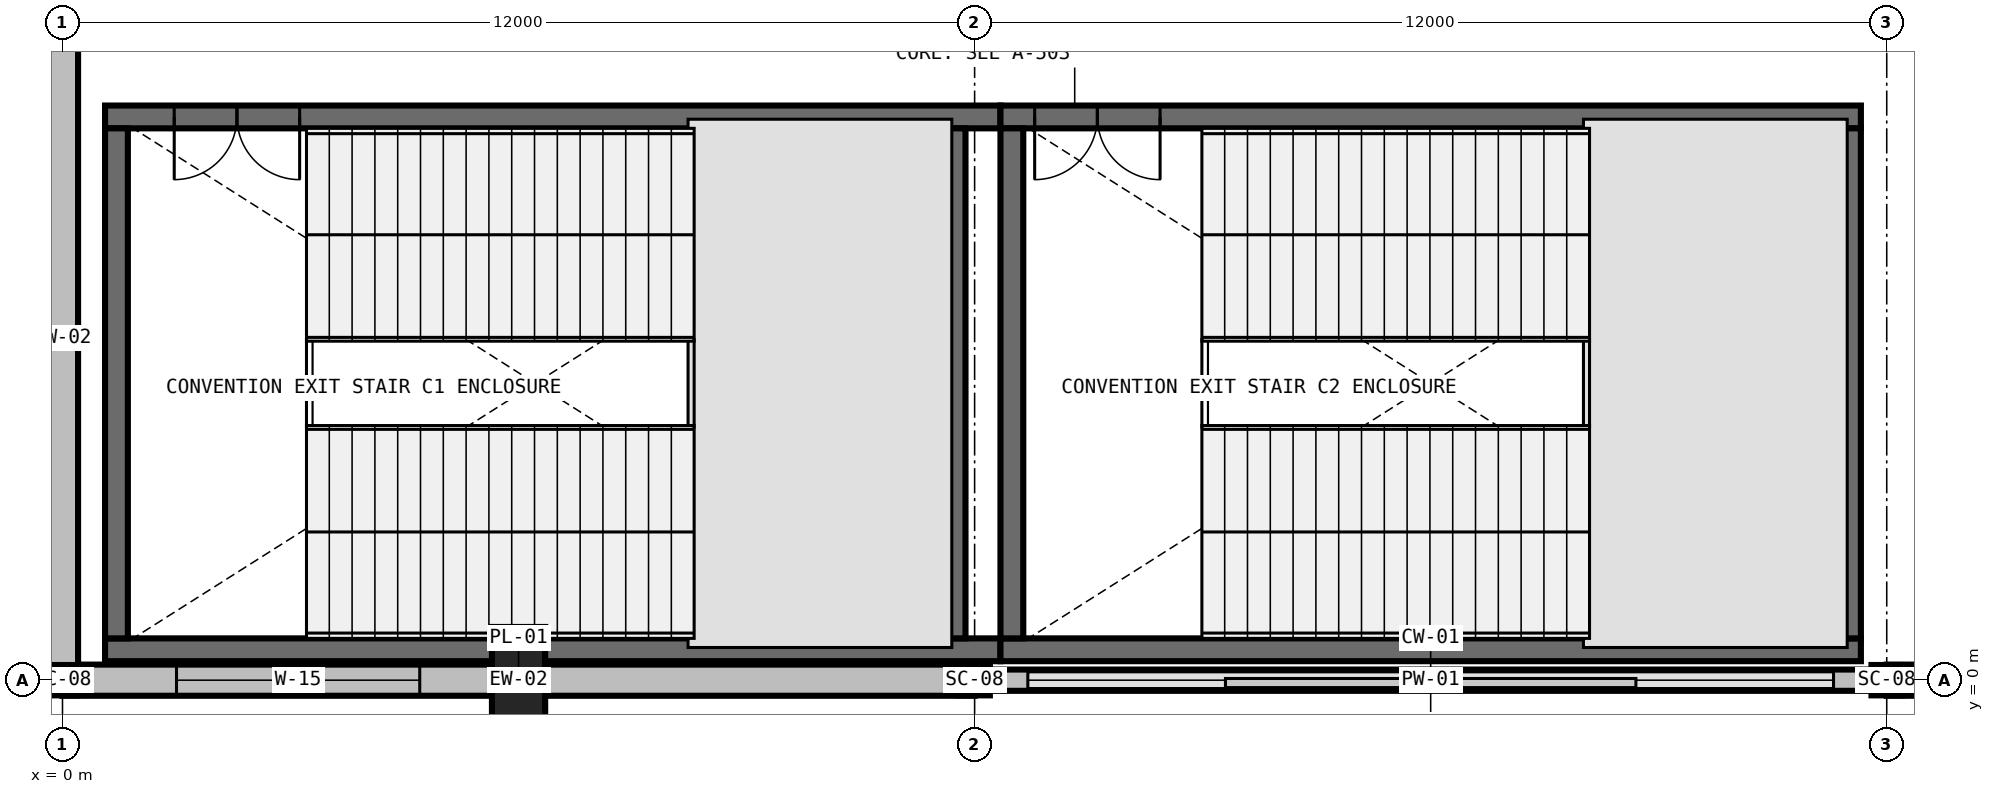
"""IFC4 building model, lengths in metres.
Left out: names, types, materials, properties, quantities, classifications, styles, units other than length and angle.
Written with IfcOpenShell. Run it as: python <this file> out.ifc"""

import sys

from ifc_helpers import new_model, si_unit, direction, frame, frame_2d, origin, origin_with_axes, origin_2d, place, context, subcontext, project, spatial, rectangle, i_section, extrude, element, fill, save


model = new_model("IFC4")
c1 = context("Model", 3, precision=1e-05, world=origin(), true_north=direction((0.0, 1.0)))
c2 = subcontext(c1, "Body", "Model", "MODEL_VIEW")
j1 = project(units=[si_unit("LENGTHUNIT", "METRE"), si_unit("PLANEANGLEUNIT", "RADIAN")], contexts=[c1])
p1 = place(None, origin())
s1 = spatial("IfcSite", under=j1, at=p1, CompositionType="ELEMENT")
p2 = place(p1, origin())
s2 = spatial("IfcBuilding", under=s1, at=p2, CompositionType="ELEMENT")
p3 = place(p2, frame((0.0, 0.0, 6.0)))
s3 = spatial("IfcBuildingStorey", under=s2, at=p3, CompositionType="ELEMENT", Elevation=6.0)
for number, where, z_axis, x_axis in (
    (1, (0.0, 0.0, 0.0), (0.0, 0.0, 1.0), (1.0, 0.0, 0.0)),
    (2, (12.0, 0.0, 0.0), (0.0, 0.0, 1.0), (1.0, 0.0, 0.0)),
    (3, (24.0, 0.0, 0.0), (0.0, 0.0, 1.0), (1.0, 0.0, 0.0)),
):
    element("IfcColumn", number, at=place(p3, frame(where, z_axis=z_axis, x_axis=x_axis)), inside=s3, PredefinedType="COLUMN", context=c2, shape_type="SweptSolid", body=[
        extrude(i_section(OverallWidth=0.401, OverallDepth=0.399, WebThickness=0.025, FlangeThickness=0.04, FilletRadius=0.031, at=origin_2d()), origin(), (0.0, 0.0, 1.0), 6.0),
    ])
p4 = place(p3, frame((6.0, 0.0, 0.0), z_axis=(0.0, 0.0, 1.0), x_axis=(1.0, 0.0, 0.0)))
e4 = element("IfcColumn", 4, at=p4, inside=s3, PredefinedType="PILASTER", context=c2, shape_type="SweptSolid", body=[
    extrude(rectangle(XDim=0.7, YDim=1.4, at=origin_2d()), origin(), (0.0, 0.0, 1.0), 6.0),
])
p5 = place(p3, frame((12.34, 0.4, 0.0), z_axis=(0.0, 0.0, 1.0), x_axis=(-1.0, 0.0, 0.0)))
e5 = element("IfcWall", 5, at=p5, inside=s3, PredefinedType="SHEAR", context=c2, shape_type="SweptSolid", body=[
    extrude(rectangle(XDim=11.78, YDim=0.3, at=frame_2d((5.89, 0.0))), origin(), (0.0, 0.0, 1.0), 6.0),
])
p6 = place(p3, frame((12.34, 7.41, 0.0), z_axis=(0.0, 0.0, 1.0), x_axis=(-1.0, 0.0, 0.0)))
e6 = element("IfcWall", 6, at=p6, inside=s3, PredefinedType="SHEAR", context=c2, shape_type="SweptSolid", body=[
    extrude(rectangle(XDim=11.78, YDim=0.3, at=frame_2d((5.89, 0.0))), origin(), (0.0, 0.0, 1.0), 6.0),
])
p7 = place(p6, frame((9.22, 0.0, 0.0)))
e7 = element("IfcOpeningElement", 7, at=p7, cuts=e6, PredefinedType="OPENING", context=c2, shape_type="SweptSolid", body=[
    extrude(rectangle(XDim=1.65, YDim=2.25, at=frame_2d((0.825, 1.125))), frame((0.0, 0.165, 0.0), z_axis=(0.0, -1.0, 0.0), x_axis=(1.0, 0.0, 0.0)), (0.0, 0.0, 1.0), 0.33),
])
for number, where, z_axis, x_axis in (
    (8, (0.71, 7.26, 0.0), (0.0, 0.0, 1.0), (0.0, -1.0, 0.0)),
    (9, (11.73, 0.55, 0.0), (0.0, 0.0, 1.0), (0.0, 1.0, 0.0)),
):
    element("IfcWall", number, at=place(p3, frame(where, z_axis=z_axis, x_axis=x_axis)), inside=s3, PredefinedType="SHEAR", context=c2, shape_type="SweptSolid", body=[
        extrude(rectangle(XDim=6.71, YDim=0.3, at=frame_2d((3.355, 0.0))), origin(), (0.0, 0.0, 1.0), 6.0),
    ])
p8 = place(p3, frame((23.66, 0.4, 0.0), z_axis=(0.0, 0.0, 1.0), x_axis=(-1.0, 0.0, 0.0)))
e10 = element("IfcWall", 10, at=p8, inside=s3, PredefinedType="SHEAR", context=c2, shape_type="SweptSolid", body=[
    extrude(rectangle(XDim=11.32, YDim=0.3, at=frame_2d((5.66, 0.0))), origin(), (0.0, 0.0, 1.0), 6.0),
])
p9 = place(p3, frame((23.66, 7.41, 0.0), z_axis=(0.0, 0.0, 1.0), x_axis=(-1.0, 0.0, 0.0)))
e11 = element("IfcWall", 11, at=p9, inside=s3, PredefinedType="SHEAR", context=c2, shape_type="SweptSolid", body=[
    extrude(rectangle(XDim=11.32, YDim=0.3, at=frame_2d((5.66, 0.0))), origin(), (0.0, 0.0, 1.0), 6.0),
])
p10 = place(p9, frame((9.22, 0.0, 0.0)))
e12 = element("IfcOpeningElement", 12, at=p10, cuts=e11, PredefinedType="OPENING", context=c2, shape_type="SweptSolid", body=[
    extrude(rectangle(XDim=1.65, YDim=2.25, at=frame_2d((0.825, 1.125))), frame((0.0, 0.165, 0.0), z_axis=(0.0, -1.0, 0.0), x_axis=(1.0, 0.0, 0.0)), (0.0, 0.0, 1.0), 0.33),
])
for number, where, z_axis, x_axis in (
    (13, (12.49, 7.26, 0.0), (0.0, 0.0, 1.0), (0.0, -1.0, 0.0)),
    (14, (23.51, 0.55, 0.0), (0.0, 0.0, 1.0), (0.0, 1.0, 0.0)),
):
    element("IfcWall", number, at=place(p3, frame(where, z_axis=z_axis, x_axis=x_axis)), inside=s3, PredefinedType="SHEAR", context=c2, shape_type="SweptSolid", body=[
        extrude(rectangle(XDim=6.71, YDim=0.3, at=frame_2d((3.355, 0.0))), origin(), (0.0, 0.0, 1.0), 6.0),
    ])
p11 = place(p3, origin_with_axes())
e15 = element("IfcWall", 15, at=p11, inside=s3, PredefinedType="STANDARD", context=c2, shape_type="SweptSolid", body=[
    extrude(rectangle(XDim=12.0, YDim=0.41, at=frame_2d((6.0, 0.0))), origin(), (0.0, 0.0, 1.0), 4.676),
])
p12 = place(p11, frame((1.5, 0.0, 0.85)))
e16 = element("IfcOpeningElement", 16, at=p12, cuts=e15, PredefinedType="OPENING", context=c2, shape_type="SweptSolid", body=[
    extrude(rectangle(XDim=3.2, YDim=2.4, at=frame_2d((1.6, 1.2))), frame((0.0, 0.22, 0.0), z_axis=(0.0, -1.0, 0.0), x_axis=(1.0, 0.0, 0.0)), (0.0, 0.0, 1.0), 0.44),
])
p13 = place(p3, frame((12.0, 0.0, 0.0), z_axis=(0.0, 0.0, 1.0), x_axis=(1.0, 0.0, 0.0)))
e17 = element("IfcWall", 17, at=p13, inside=s3, PredefinedType="PARAPET", context=c2, shape_type="SweptSolid", body=[
    extrude(rectangle(XDim=12.0, YDim=0.28, at=frame_2d((6.0, 0.0))), origin(), (0.0, 0.0, 1.0), 0.2),
])
p14 = place(p3, frame((24.0, 0.0, 0.0), z_axis=(0.0, 0.0, 1.0), x_axis=(1.0, 0.0, 0.0)))
e18 = element("IfcWall", 18, at=p14, inside=s3, PredefinedType="STANDARD", context=c2, shape_type="SweptSolid", body=[
    extrude(rectangle(XDim=6.0, YDim=0.41, at=frame_2d((3.0, 0.0))), origin(), (0.0, 0.0, 1.0), 4.676),
])
p15 = place(p3, frame((0.0, 9.0, 0.0), z_axis=(0.0, 0.0, 1.0), x_axis=(0.0, -1.0, 0.0)))
e19 = element("IfcWall", 19, at=p15, inside=s3, PredefinedType="STANDARD", context=c2, shape_type="SweptSolid", body=[
    extrude(rectangle(XDim=9.0, YDim=0.41, at=frame_2d((4.5, 0.0))), origin(), (0.0, 0.0, 1.0), 5.269),
])
p16 = place(p7, origin())
e20 = element("IfcDoor", 20, at=p16, inside=s3, OperationType="DOUBLE_DOOR_SINGLE_SWING", PredefinedType="DOOR", context=c2, shape_type="SweptSolid", body=[
    extrude(rectangle(XDim=1.65, YDim=2.25, at=frame_2d((0.825, 1.125))), frame((0.0, 0.025, 0.0), z_axis=(0.0, -1.0, 0.0), x_axis=(1.0, 0.0, 0.0)), (0.0, 0.0, 1.0), 0.05),
])
fill(e7, e20)
p17 = place(p10, origin())
e21 = element("IfcDoor", 21, at=p17, inside=s3, OperationType="DOUBLE_DOOR_SINGLE_SWING", PredefinedType="DOOR", context=c2, shape_type="SweptSolid", body=[
    extrude(rectangle(XDim=1.65, YDim=2.25, at=frame_2d((0.825, 1.125))), frame((0.0, 0.025, 0.0), z_axis=(0.0, -1.0, 0.0), x_axis=(1.0, 0.0, 0.0)), (0.0, 0.0, 1.0), 0.05),
])
fill(e12, e21)
p18 = place(p12, origin())
e22 = element("IfcWindow", 22, at=p18, inside=s3, PartitioningType="TRIPLE_PANEL_VERTICAL", PredefinedType="WINDOW", context=c2, shape_type="SweptSolid", body=[
    extrude(rectangle(XDim=3.2, YDim=2.4, at=frame_2d((1.6, 1.2))), frame((0.0, 0.03, 0.0), z_axis=(0.0, -1.0, 0.0), x_axis=(1.0, 0.0, 0.0)), (0.0, 0.0, 1.0), 0.06),
])
fill(e16, e22)
save(model, sys.argv[1])
